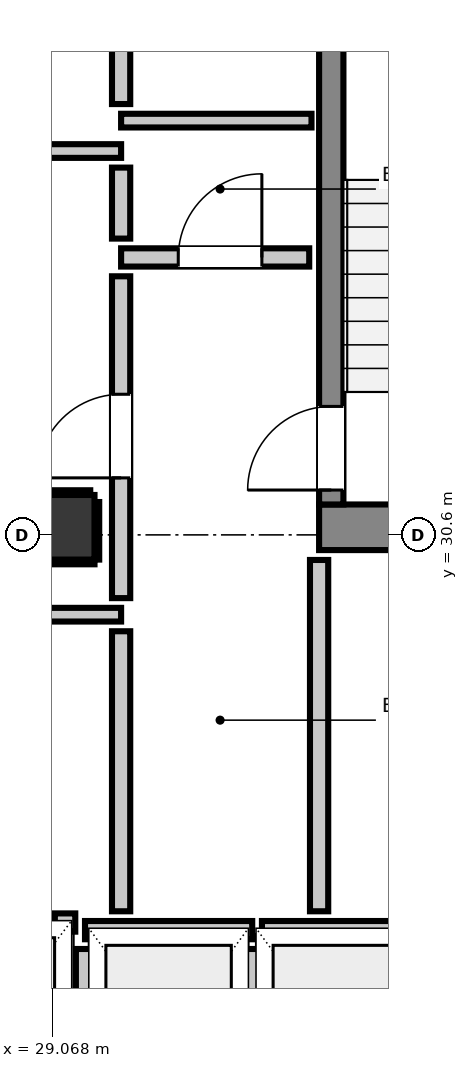
"""IFC4 building model, lengths in metres.
Left out: names, types, materials, properties, quantities, classifications, styles, units other than length and angle.
Written with IfcOpenShell. Run it as: python <this file> out.ifc"""

import sys

from ifc_helpers import new_model, si_unit, direction, frame, frame_2d, origin, origin_2d, place, context, subcontext, project, spatial, rectangle, extrude, element, fill, save


model = new_model("IFC4")
c1 = context("Model", 3, precision=1e-05, world=origin(), true_north=direction((0.0, 1.0)))
c2 = subcontext(c1, "Body", "Model", "MODEL_VIEW")
j1 = project(units=[si_unit("LENGTHUNIT", "METRE"), si_unit("PLANEANGLEUNIT", "RADIAN")], contexts=[c1])
p1 = place(None, origin())
s1 = spatial("IfcSite", under=j1, at=p1, CompositionType="ELEMENT")
p2 = place(p1, origin())
s2 = spatial("IfcBuilding", under=s1, at=p2, CompositionType="ELEMENT")
p3 = place(p2, frame((0.0, 0.0, 216.72)))
s3 = spatial("IfcBuildingStorey", under=s2, at=p3, CompositionType="ELEMENT", Elevation=216.72)
p4 = place(p3, frame((32.58, 30.7, 0.0), z_axis=(0.0, 0.0, 1.0), x_axis=(1.0, 0.0, 0.0)))
e1 = element("IfcWall", 1, at=p4, inside=s3, PredefinedType="SHEAR", context=c2, shape_type="SweptSolid", body=[
    extrude(rectangle(XDim=3.54, YDim=0.6, at=frame_2d((1.77, 0.0))), origin(), (0.0, 0.0, 1.0), 3.32),
])
p5 = place(p3, frame((32.74, 31.0, 0.0), z_axis=(0.0, 0.0, 1.0), x_axis=(0.0, 1.0, 0.0)))
e2 = element("IfcWall", 2, at=p5, inside=s3, PredefinedType="SHEAR", context=c2, shape_type="SweptSolid", body=[
    extrude(rectangle(XDim=7.8, YDim=0.32, at=frame_2d((3.9, 0.0))), origin(), (0.0, 0.0, 1.0), 3.32),
])
p6 = place(p5, frame((0.19, 0.0, 0.0)))
e3 = element("IfcOpeningElement", 3, at=p6, cuts=e2, PredefinedType="OPENING", context=c2, shape_type="SweptSolid", body=[
    extrude(rectangle(XDim=1.1, YDim=2.15, at=frame_2d((0.55, 1.075))), frame((0.0, 0.17, 0.0), z_axis=(0.0, -1.0, 0.0), x_axis=(1.0, 0.0, 0.0)), (0.0, 0.0, 1.0), 0.34),
])
p7 = place(p3, frame((29.2, 30.7, 0.0), z_axis=(0.0, 0.0, 1.0), x_axis=(1.0, 0.0, 0.0)))
e4 = element("IfcColumn", 4, at=p7, inside=s3, PredefinedType="COLUMN", context=c2, shape_type="SweptSolid", body=[
    extrude(rectangle(XDim=0.85, YDim=0.85, at=origin_2d()), origin(), (0.0, 0.0, 1.0), 3.32),
])
p8 = place(p3, frame((29.5, 25.4, 0.0), z_axis=(0.0, 0.0, 1.0), x_axis=(1.0, 0.0, 0.0)))
e5 = element("IfcWall", 5, at=p8, inside=s3, PredefinedType="PARTITIONING", context=c2, shape_type="SweptSolid", body=[
    extrude(rectangle(XDim=2.2, YDim=0.24, at=frame_2d((1.1, 0.0))), origin(), (0.0, 0.0, 1.0), 3.1),
])
p9 = place(p3, frame((29.5, 22.848, 0.0), z_axis=(0.0, 0.0, 1.0), x_axis=(0.0, 1.0, 0.0)))
e6 = element("IfcWall", 6, at=p9, inside=s3, PredefinedType="PARTITIONING", context=c2, shape_type="SweptSolid", body=[
    extrude(rectangle(XDim=2.304, YDim=0.24, at=frame_2d((1.152, 0.0))), origin(), (0.0, 0.0, 1.0), 2.335),
])
p10 = place(p3, frame((31.7, 22.848, 0.0), z_axis=(0.0, 0.0, 1.0), x_axis=(0.0, 1.0, 0.0)))
e7 = element("IfcWall", 7, at=p10, inside=s3, PredefinedType="PARTITIONING", context=c2, shape_type="SweptSolid", body=[
    extrude(rectangle(XDim=2.304, YDim=0.24, at=frame_2d((1.152, 0.0))), origin(), (0.0, 0.0, 1.0), 3.1),
])
p11 = place(p3, frame((31.828, 25.4, 0.0), z_axis=(0.0, 0.0, 1.0), x_axis=(1.0, 0.0, 0.0)))
e8 = element("IfcWall", 8, at=p11, inside=s3, PredefinedType="PARTITIONING", context=c2, shape_type="SweptSolid", body=[
    extrude(rectangle(XDim=2.072, YDim=0.24, at=frame_2d((1.036, 0.0))), origin(), (0.0, 0.0, 1.0), 3.1),
])
p12 = place(p3, frame((29.103, 25.5, 0.0), z_axis=(0.0, 0.0, 1.0), x_axis=(1.0, 0.0, 0.0)))
e9 = element("IfcWall", 9, at=p12, inside=s3, PredefinedType="PARTITIONING", context=c2, shape_type="SweptSolid", body=[
    extrude(rectangle(XDim=0.269, YDim=0.24, at=frame_2d((0.135, 0.0))), origin(), (0.0, 0.0, 1.0), 3.1),
])
p13 = place(p3, frame((29.975, 34.25, 0.0), z_axis=(0.0, 0.0, 1.0), x_axis=(1.0, 0.0, 0.0)))
e10 = element("IfcWall", 10, at=p13, inside=s3, PredefinedType="PARTITIONING", context=c2, shape_type="SweptSolid", body=[
    extrude(rectangle(XDim=2.475, YDim=0.24, at=frame_2d((1.237, 0.0))), origin(), (0.0, 0.0, 1.0), 3.1),
])
p14 = place(p13, frame((0.752, 0.0, 0.0)))
e11 = element("IfcOpeningElement", 11, at=p14, cuts=e10, PredefinedType="OPENING", context=c2, shape_type="SweptSolid", body=[
    extrude(rectangle(XDim=1.1, YDim=2.15, at=frame_2d((0.55, 1.075))), frame((0.0, 0.13, 0.0), z_axis=(0.0, -1.0, 0.0), x_axis=(1.0, 0.0, 0.0)), (0.0, 0.0, 1.0), 0.26),
])
p15 = place(p3, frame((28.593, 29.55, 0.0), z_axis=(0.0, 0.0, 1.0), x_axis=(1.0, 0.0, 0.0)))
e12 = element("IfcWall", 12, at=p15, inside=s3, PredefinedType="PARTITIONING", context=c2, shape_type="SweptSolid", body=[
    extrude(rectangle(XDim=1.382, YDim=0.18, at=frame_2d((0.691, 0.0))), origin(), (0.0, 0.0, 1.0), 3.1),
])
p16 = place(p3, frame((18.95, 35.65, 0.0), z_axis=(0.0, 0.0, 1.0), x_axis=(1.0, 0.0, 0.0)))
e13 = element("IfcWall", 13, at=p16, inside=s3, PredefinedType="PARTITIONING", context=c2, shape_type="SweptSolid", body=[
    extrude(rectangle(XDim=11.025, YDim=0.18, at=frame_2d((5.513, 0.0))), origin(), (0.0, 0.0, 1.0), 3.1),
])
p17 = place(p3, frame((29.975, 36.05, 0.0), z_axis=(0.0, 0.0, 1.0), x_axis=(1.0, 0.0, 0.0)))
e14 = element("IfcWall", 14, at=p17, inside=s3, PredefinedType="PARTITIONING", context=c2, shape_type="SweptSolid", body=[
    extrude(rectangle(XDim=2.505, YDim=0.18, at=frame_2d((1.252, 0.0))), origin(), (0.0, 0.0, 1.0), 3.1),
])
p18 = place(p3, frame((29.975, 25.648, 0.0), z_axis=(0.0, 0.0, 1.0), x_axis=(0.0, 1.0, 0.0)))
e15 = element("IfcWall", 15, at=p18, inside=s3, PredefinedType="PARTITIONING", context=c2, shape_type="SweptSolid", body=[
    extrude(rectangle(XDim=3.684, YDim=0.24, at=frame_2d((1.842, 0.0))), origin(), (0.0, 0.0, 1.0), 3.1),
])
p19 = place(p3, frame((29.975, 29.768, 0.0), z_axis=(0.0, 0.0, 1.0), x_axis=(0.0, 1.0, 0.0)))
e16 = element("IfcWall", 16, at=p19, inside=s3, PredefinedType="PARTITIONING", context=c2, shape_type="SweptSolid", body=[
    extrude(rectangle(XDim=4.234, YDim=0.24, at=frame_2d((2.117, 0.0))), origin(), (0.0, 0.0, 1.0), 3.1),
])
p20 = place(p19, frame((1.582, 0.0, 0.0)))
e17 = element("IfcOpeningElement", 17, at=p20, cuts=e16, PredefinedType="OPENING", context=c2, shape_type="SweptSolid", body=[
    extrude(rectangle(XDim=1.1, YDim=2.15, at=frame_2d((0.55, 1.075))), frame((0.0, 0.13, 0.0), z_axis=(0.0, -1.0, 0.0), x_axis=(1.0, 0.0, 0.0)), (0.0, 0.0, 1.0), 0.26),
])
p21 = place(p3, frame((29.975, 34.498, 0.0), z_axis=(0.0, 0.0, 1.0), x_axis=(0.0, 1.0, 0.0)))
e18 = element("IfcWall", 18, at=p21, inside=s3, PredefinedType="PARTITIONING", context=c2, shape_type="SweptSolid", body=[
    extrude(rectangle(XDim=0.934, YDim=0.24, at=frame_2d((0.467, 0.0))), origin(), (0.0, 0.0, 1.0), 3.1),
])
p22 = place(p3, frame((29.975, 36.268, 0.0), z_axis=(0.0, 0.0, 1.0), x_axis=(0.0, 1.0, 0.0)))
e19 = element("IfcWall", 19, at=p22, inside=s3, PredefinedType="PARTITIONING", context=c2, shape_type="SweptSolid", body=[
    extrude(rectangle(XDim=2.444, YDim=0.24, at=frame_2d((1.222, 0.0))), origin(), (0.0, 0.0, 1.0), 3.1),
])
p23 = place(p3, frame((32.58, 25.648, 0.0), z_axis=(0.0, 0.0, 1.0), x_axis=(0.0, 1.0, 0.0)))
e20 = element("IfcWall", 20, at=p23, inside=s3, PredefinedType="PARTITIONING", context=c2, shape_type="SweptSolid", body=[
    extrude(rectangle(XDim=4.622, YDim=0.24, at=frame_2d((2.311, 0.0))), origin(), (0.0, 0.0, 1.0), 3.1),
])
p24 = place(p3, frame((28.775, 30.243, 0.0), z_axis=(0.0, 0.0, 1.0), x_axis=(1.0, 0.0, 0.0)))
e21 = element("IfcWall", 21, at=p24, inside=s3, PredefinedType="PARTITIONING", context=c2, shape_type="SweptSolid", body=[
    extrude(rectangle(XDim=0.85, YDim=0.06, at=frame_2d((0.425, 0.0))), origin(), (0.0, 0.0, 1.0), 1.45),
])
p25 = place(p3, frame((28.775, 31.157, 0.0), z_axis=(0.0, 0.0, 1.0), x_axis=(1.0, 0.0, 0.0)))
e22 = element("IfcWall", 22, at=p25, inside=s3, PredefinedType="PARTITIONING", context=c2, shape_type="SweptSolid", body=[
    extrude(rectangle(XDim=0.794, YDim=0.06, at=frame_2d((0.397, 0.0))), origin(), (0.0, 0.0, 1.0), 1.45),
])
p26 = place(p3, frame((29.657, 30.275, 0.0), z_axis=(0.0, 0.0, 1.0), x_axis=(0.0, 1.0, 0.0)))
e23 = element("IfcWall", 23, at=p26, inside=s3, PredefinedType="PARTITIONING", context=c2, shape_type="SweptSolid", body=[
    extrude(rectangle(XDim=0.757, YDim=0.06, at=frame_2d((0.378, 0.0))), origin(), (0.0, 0.0, 1.0), 1.45),
])
p27 = place(p6, origin())
e24 = element("IfcDoor", 24, at=p27, inside=s3, OperationType="SINGLE_SWING_LEFT", PredefinedType="DOOR", context=c2, shape_type="SweptSolid", body=[
    extrude(rectangle(XDim=1.1, YDim=2.15, at=frame_2d((0.55, 1.075))), frame((0.0, 0.025, 0.0), z_axis=(0.0, -1.0, 0.0), x_axis=(1.0, 0.0, 0.0)), (0.0, 0.0, 1.0), 0.05),
])
fill(e3, e24)
p28 = place(p20, origin())
e25 = element("IfcDoor", 25, at=p28, inside=s3, OperationType="SINGLE_SWING_LEFT", PredefinedType="DOOR", context=c2, shape_type="SweptSolid", body=[
    extrude(rectangle(XDim=1.1, YDim=2.15, at=frame_2d((0.55, 1.075))), frame((0.0, 0.025, 0.0), z_axis=(0.0, -1.0, 0.0), x_axis=(1.0, 0.0, 0.0)), (0.0, 0.0, 1.0), 0.05),
])
fill(e17, e25)
p29 = place(p14, origin())
e26 = element("IfcDoor", 26, at=p29, inside=s3, OperationType="SINGLE_SWING_RIGHT", PredefinedType="DOOR", context=c2, shape_type="SweptSolid", body=[
    extrude(rectangle(XDim=1.1, YDim=2.15, at=frame_2d((0.55, 1.075))), frame((0.0, 0.025, 0.0), z_axis=(0.0, -1.0, 0.0), x_axis=(1.0, 0.0, 0.0)), (0.0, 0.0, 1.0), 0.05),
])
fill(e11, e26)
save(model, sys.argv[1])
